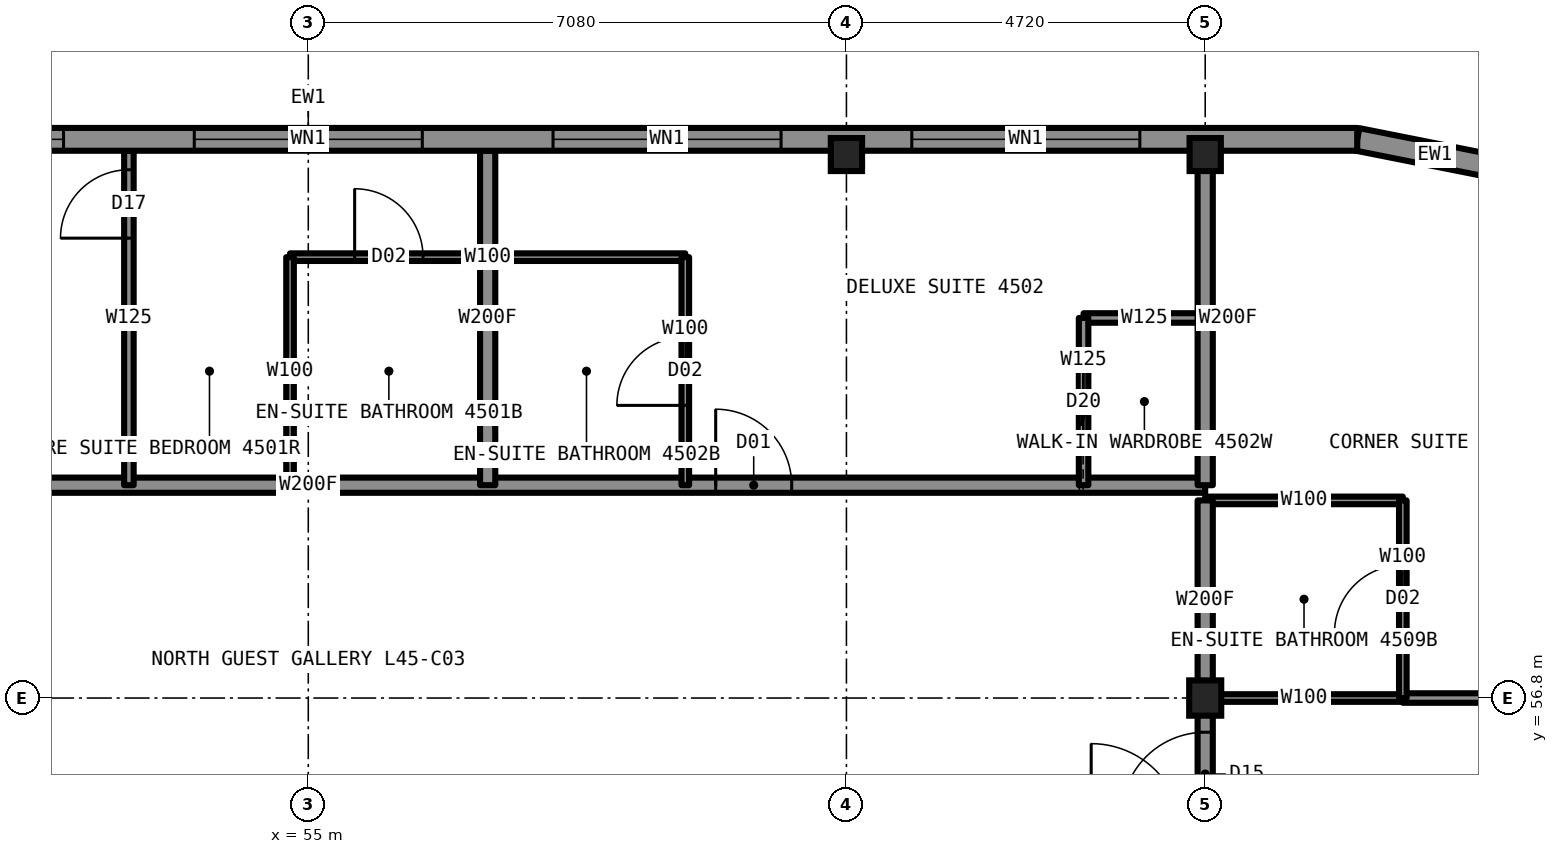
"""IFC4 building model, lengths in metres.
Left out: names, types, materials, properties, quantities, classifications, styles, units other than length and angle.
Written with IfcOpenShell. Run it as: python <this file> out.ifc"""

import sys

from ifc_helpers import new_model, si_unit, direction, frame, frame_2d, origin, origin_2d, place, context, subcontext, project, spatial, rectangle, i_section, extrude, element, fill, save


model = new_model("IFC4")
c1 = context("Model", 3, precision=1e-05, world=origin(), true_north=direction((0.0, 1.0)))
c2 = subcontext(c1, "Body", "Model", "MODEL_VIEW")
j1 = project(units=[si_unit("LENGTHUNIT", "METRE"), si_unit("PLANEANGLEUNIT", "RADIAN")], contexts=[c1])
p1 = place(None, origin())
s1 = spatial("IfcSite", under=j1, at=p1, CompositionType="ELEMENT")
p2 = place(p1, origin())
s2 = spatial("IfcBuilding", under=s1, at=p2, CompositionType="ELEMENT")
p3 = place(p2, frame((0.0, 0.0, 161.8)))
s3 = spatial("IfcBuildingStorey", under=s2, at=p3, CompositionType="ELEMENT", Elevation=161.8)
for number, where, z_axis, x_axis in (
    (1, (62.08, 63.95, 0.0), (0.0, 0.0, 1.0), (1.0, 0.0, 0.0)),
    (2, (66.8, 63.95, 0.0), (0.0, 0.0, 1.0), (1.0, 0.0, 0.0)),
):
    element("IfcColumn", number, at=place(p3, frame(where, z_axis=z_axis, x_axis=x_axis)), inside=s3, PredefinedType="COLUMN", context=c2, shape_type="SweptSolid", body=[
        extrude(i_section(OverallWidth=0.442, OverallDepth=0.531, WebThickness=0.066, FlangeThickness=0.106, at=origin_2d()), origin(), (0.0, 0.0, 1.0), 3.5),
    ])
p4 = place(p3, frame((66.8, 56.8, 0.0), z_axis=(0.0, 0.0, 1.0), x_axis=(1.0, 0.0, 0.0)))
e3 = element("IfcColumn", 3, at=p4, inside=s3, PredefinedType="COLUMN", context=c2, shape_type="SweptSolid", body=[
    extrude(i_section(OverallWidth=0.422, OverallDepth=0.465, WebThickness=0.045, FlangeThickness=0.073, at=origin_2d()), origin(), (0.0, 0.0, 1.0), 3.5),
])
p5 = place(p3, frame((66.8, 56.8, 0.0), z_axis=(0.0, 0.0, 1.0), x_axis=(1.0, 0.0, 0.0)))
e4 = element("IfcWall", 4, at=p5, inside=s3, PredefinedType="PARTITIONING", context=c2, shape_type="SweptSolid", body=[
    extrude(rectangle(XDim=2.6, YDim=0.1, at=frame_2d((1.3, 0.0))), origin(), (0.0, 0.0, 1.0), 2.573),
])
p6 = place(p3, frame((69.4, 56.8, 0.0), z_axis=(0.0, 0.0, 1.0), x_axis=(1.0, 0.0, 0.0)))
e5 = element("IfcWall", 5, at=p6, inside=s3, PredefinedType="PARTITIONING", context=c2, shape_type="SweptSolid", body=[
    extrude(rectangle(XDim=4.6, YDim=0.125, at=frame_2d((2.3, 0.0))), origin(), (0.0, 0.0, 1.0), 2.573),
])
p7 = place(p6, frame((1.15, 0.0, 0.0)))
e6 = element("IfcOpeningElement", 6, at=p7, cuts=e5, PredefinedType="OPENING", context=c2, shape_type="SweptSolid", body=[
    extrude(rectangle(XDim=0.9, YDim=2.2, at=frame_2d((0.45, 1.1))), frame((0.0, 0.073, 0.0), z_axis=(0.0, -1.0, 0.0), x_axis=(1.0, 0.0, 0.0)), (0.0, 0.0, 1.0), 0.145),
])
p8 = place(p3, frame((66.8, 59.4, 0.0), z_axis=(0.0, 0.0, 1.0), x_axis=(1.0, 0.0, 0.0)))
e7 = element("IfcWall", 7, at=p8, inside=s3, PredefinedType="PARTITIONING", context=c2, shape_type="SweptSolid", body=[
    extrude(rectangle(XDim=2.6, YDim=0.1, at=frame_2d((1.3, 0.0))), origin(), (0.0, 0.0, 1.0), 3.33),
])
p9 = place(p3, frame((43.2, 59.6, 0.0), z_axis=(0.0, 0.0, 1.0), x_axis=(1.0, 0.0, 0.0)))
e8 = element("IfcWall", 8, at=p9, inside=s3, PredefinedType="PARTITIONING", context=c2, shape_type="SweptSolid", body=[
    extrude(rectangle(XDim=23.6, YDim=0.2, at=frame_2d((11.8, 0.0))), origin(), (0.0, 0.0, 1.0), 3.33),
])
p10 = place(p9, frame((1.85, 0.0, 0.0)))
e9 = element("IfcOpeningElement", 9, at=p10, cuts=e8, PredefinedType="OPENING", context=c2, shape_type="SweptSolid", body=[
    extrude(rectangle(XDim=1.1, YDim=2.2, at=frame_2d((0.55, 1.1))), frame((0.0, 0.11, 0.0), z_axis=(0.0, -1.0, 0.0), x_axis=(1.0, 0.0, 0.0)), (0.0, 0.0, 1.0), 0.22),
])
p11 = place(p9, frame((17.16, 0.0, 0.0)))
e10 = element("IfcOpeningElement", 10, at=p11, cuts=e8, PredefinedType="OPENING", context=c2, shape_type="SweptSolid", body=[
    extrude(rectangle(XDim=1.0, YDim=2.2, at=frame_2d((0.5, 1.1))), frame((0.0, 0.11, 0.0), z_axis=(0.0, -1.0, 0.0), x_axis=(1.0, 0.0, 0.0)), (0.0, 0.0, 1.0), 0.22),
])
p12 = place(p3, frame((65.2, 61.8, 0.0), z_axis=(0.0, 0.0, 1.0), x_axis=(1.0, 0.0, 0.0)))
e11 = element("IfcWall", 11, at=p12, inside=s3, PredefinedType="PARTITIONING", context=c2, shape_type="SweptSolid", body=[
    extrude(rectangle(XDim=1.6, YDim=0.125, at=frame_2d((0.8, 0.0))), origin(), (0.0, 0.0, 1.0), 3.33),
])
p13 = place(p3, frame((54.76, 62.6, 0.0), z_axis=(0.0, 0.0, 1.0), x_axis=(1.0, 0.0, 0.0)))
e12 = element("IfcWall", 12, at=p13, inside=s3, PredefinedType="PARTITIONING", context=c2, shape_type="SweptSolid", body=[
    extrude(rectangle(XDim=5.2, YDim=0.1, at=frame_2d((2.6, 0.0))), origin(), (0.0, 0.0, 1.0), 3.33),
])
p14 = place(p13, frame((0.85, 0.0, 0.0)))
e13 = element("IfcOpeningElement", 13, at=p14, cuts=e12, PredefinedType="OPENING", context=c2, shape_type="SweptSolid", body=[
    extrude(rectangle(XDim=0.9, YDim=2.1, at=frame_2d((0.45, 1.05))), frame((0.0, 0.06, 0.0), z_axis=(0.0, -1.0, 0.0), x_axis=(1.0, 0.0, 0.0)), (0.0, 0.0, 1.0), 0.12),
])
p15 = place(p3, frame((54.76, 59.6, 0.0), z_axis=(0.0, 0.0, 1.0), x_axis=(0.0, 1.0, 0.0)))
e14 = element("IfcWall", 14, at=p15, inside=s3, PredefinedType="PARTITIONING", context=c2, shape_type="SweptSolid", body=[
    extrude(rectangle(XDim=3.0, YDim=0.1, at=frame_2d((1.5, 0.0))), origin(), (0.0, 0.0, 1.0), 3.33),
])
p16 = place(p3, frame((52.64, 59.6, 0.0), z_axis=(0.0, 0.0, 1.0), x_axis=(0.0, 1.0, 0.0)))
e15 = element("IfcWall", 15, at=p16, inside=s3, PredefinedType="PARTITIONING", context=c2, shape_type="SweptSolid", body=[
    extrude(rectangle(XDim=4.4, YDim=0.125, at=frame_2d((2.2, 0.0))), origin(), (0.0, 0.0, 1.0), 3.33),
])
p17 = place(p16, frame((3.25, 0.0, 0.0)))
e16 = element("IfcOpeningElement", 16, at=p17, cuts=e15, PredefinedType="OPENING", context=c2, shape_type="SweptSolid", body=[
    extrude(rectangle(XDim=0.9, YDim=2.2, at=frame_2d((0.45, 1.1))), frame((0.0, 0.073, 0.0), z_axis=(0.0, -1.0, 0.0), x_axis=(1.0, 0.0, 0.0)), (0.0, 0.0, 1.0), 0.145),
])
p18 = place(p3, frame((65.2, 59.6, 0.0), z_axis=(0.0, 0.0, 1.0), x_axis=(0.0, 1.0, 0.0)))
e17 = element("IfcWall", 17, at=p18, inside=s3, PredefinedType="PARTITIONING", context=c2, shape_type="SweptSolid", body=[
    extrude(rectangle(XDim=2.2, YDim=0.125, at=frame_2d((1.1, 0.0))), origin(), (0.0, 0.0, 1.0), 3.33),
])
p19 = place(p18, frame((0.7, 0.0, 0.0)))
e18 = element("IfcOpeningElement", 18, at=p19, cuts=e17, PredefinedType="OPENING", context=c2, shape_type="SweptSolid", body=[
    extrude(rectangle(XDim=0.8, YDim=2.1, at=frame_2d((0.4, 1.05))), frame((0.0, 0.073, 0.0), z_axis=(0.0, -1.0, 0.0), x_axis=(1.0, 0.0, 0.0)), (0.0, 0.0, 1.0), 0.145),
])
p20 = place(p3, frame((66.8, 33.22, 0.0), z_axis=(0.0, 0.0, 1.0), x_axis=(0.0, 1.0, 0.0)))
e19 = element("IfcWall", 19, at=p20, inside=s3, PredefinedType="PARTITIONING", context=c2, shape_type="SweptSolid", body=[
    extrude(rectangle(XDim=23.56, YDim=0.2, at=frame_2d((11.78, 0.0))), origin(), (0.0, 0.0, 1.0), 3.33),
])
p21 = place(p20, frame((5.1, 0.0, 0.0)))
e20 = element("IfcOpeningElement", 20, at=p21, cuts=e19, PredefinedType="OPENING", context=c2, shape_type="SweptSolid", body=[
    extrude(rectangle(XDim=1.0, YDim=2.2, at=frame_2d((0.5, 1.1))), frame((0.0, 0.11, 0.0), z_axis=(0.0, -1.0, 0.0), x_axis=(1.0, 0.0, 0.0)), (0.0, 0.0, 1.0), 0.22),
])
p22 = place(p20, frame((12.42, 0.0, 0.0)))
e21 = element("IfcOpeningElement", 21, at=p22, cuts=e19, PredefinedType="OPENING", context=c2, shape_type="SweptSolid", body=[
    extrude(rectangle(XDim=1.0, YDim=2.2, at=frame_2d((0.5, 1.1))), frame((0.0, 0.11, 0.0), z_axis=(0.0, -1.0, 0.0), x_axis=(1.0, 0.0, 0.0)), (0.0, 0.0, 1.0), 0.22),
])
p23 = place(p20, frame((22.03, 0.0, 0.0)))
e22 = element("IfcOpeningElement", 22, at=p23, cuts=e19, PredefinedType="OPENING", context=c2, shape_type="SweptSolid", body=[
    extrude(rectangle(XDim=1.1, YDim=2.2, at=frame_2d((0.55, 1.1))), frame((0.0, 0.11, 0.0), z_axis=(0.0, -1.0, 0.0), x_axis=(1.0, 0.0, 0.0)), (0.0, 0.0, 1.0), 0.22),
])
p24 = place(p20, frame((0.63, 0.0, 0.0)))
e23 = element("IfcOpeningElement", 23, at=p24, cuts=e19, PredefinedType="OPENING", context=c2, shape_type="SweptSolid", body=[
    extrude(rectangle(XDim=1.1, YDim=2.2, at=frame_2d((0.55, 1.1))), frame((0.0, 0.11, 0.0), z_axis=(0.0, -1.0, 0.0), x_axis=(1.0, 0.0, 0.0)), (0.0, 0.0, 1.0), 0.22),
])
p25 = place(p3, frame((66.8, 59.6, 0.0), z_axis=(0.0, 0.0, 1.0), x_axis=(0.0, 1.0, 0.0)))
e24 = element("IfcWall", 24, at=p25, inside=s3, PredefinedType="PARTITIONING", context=c2, shape_type="SweptSolid", body=[
    extrude(rectangle(XDim=4.4, YDim=0.2, at=frame_2d((2.2, 0.0))), origin(), (0.0, 0.0, 1.0), 2.573),
])
p26 = place(p3, frame((69.4, 56.8, 0.0), z_axis=(0.0, 0.0, 1.0), x_axis=(0.0, 1.0, 0.0)))
e25 = element("IfcWall", 25, at=p26, inside=s3, PredefinedType="PARTITIONING", context=c2, shape_type="SweptSolid", body=[
    extrude(rectangle(XDim=2.6, YDim=0.1, at=frame_2d((1.3, 0.0))), origin(), (0.0, 0.0, 1.0), 3.33),
])
p27 = place(p26, frame((0.85, 0.0, 0.0)))
e26 = element("IfcOpeningElement", 26, at=p27, cuts=e25, PredefinedType="OPENING", context=c2, shape_type="SweptSolid", body=[
    extrude(rectangle(XDim=0.9, YDim=2.1, at=frame_2d((0.45, 1.05))), frame((0.0, 0.06, 0.0), z_axis=(0.0, -1.0, 0.0), x_axis=(1.0, 0.0, 0.0)), (0.0, 0.0, 1.0), 0.12),
])
p28 = place(p3, frame((57.36, 59.6, 0.0), z_axis=(0.0, 0.0, 1.0), x_axis=(0.0, 1.0, 0.0)))
e27 = element("IfcWall", 27, at=p28, inside=s3, PredefinedType="PARTITIONING", context=c2, shape_type="SweptSolid", body=[
    extrude(rectangle(XDim=4.4, YDim=0.2, at=frame_2d((2.2, 0.0))), origin(), (0.0, 0.0, 1.0), 3.33),
])
p29 = place(p3, frame((59.96, 59.6, 0.0), z_axis=(0.0, 0.0, 1.0), x_axis=(0.0, 1.0, 0.0)))
e28 = element("IfcWall", 28, at=p29, inside=s3, PredefinedType="PARTITIONING", context=c2, shape_type="SweptSolid", body=[
    extrude(rectangle(XDim=3.0, YDim=0.1, at=frame_2d((1.5, 0.0))), origin(), (0.0, 0.0, 1.0), 3.33),
])
p30 = place(p29, frame((1.05, 0.0, 0.0)))
e29 = element("IfcOpeningElement", 29, at=p30, cuts=e28, PredefinedType="OPENING", context=c2, shape_type="SweptSolid", body=[
    extrude(rectangle(XDim=0.9, YDim=2.1, at=frame_2d((0.45, 1.05))), frame((0.0, 0.06, 0.0), z_axis=(0.0, -1.0, 0.0), x_axis=(1.0, 0.0, 0.0)), (0.0, 0.0, 1.0), 0.12),
])
p31 = place(p3, frame((70.847, 63.743, 0.0), z_axis=(0.0, 0.0, 1.0), x_axis=(-0.980787050784, 0.195081421501, 0.0)))
e30 = element("IfcWall", 30, at=p31, inside=s3, PredefinedType="SOLIDWALL", context=c2, shape_type="SweptSolid", body=[
    extrude(rectangle(XDim=2.087, YDim=0.3, at=frame_2d((1.044, 0.0))), origin(), (0.0, 0.0, 1.0), 3.33),
])
p32 = place(p31, frame((0.444, 0.0, 0.3)))
e31 = element("IfcOpeningElement", 31, at=p32, cuts=e30, PredefinedType="OPENING", context=c2, shape_type="SweptSolid", body=[
    extrude(rectangle(XDim=1.2, YDim=2.0, at=frame_2d((0.6, 1.0))), frame((0.0, 0.16, 0.0), z_axis=(0.0, -1.0, 0.0), x_axis=(1.0, 0.0, 0.0)), (0.0, 0.0, 1.0), 0.32),
])
p33 = place(p3, frame((68.8, 64.15, 0.0), z_axis=(0.0, 0.0, 1.0), x_axis=(-1.0, 0.0, 0.0)))
e32 = element("IfcWall", 32, at=p33, inside=s3, PredefinedType="SOLIDWALL", context=c2, shape_type="SweptSolid", body=[
    extrude(rectangle(XDim=27.6, YDim=0.3, at=frame_2d((13.8, 0.0))), origin(), (0.0, 0.0, 1.0), 2.83),
])
p34 = place(p33, frame((2.86, 0.0, 0.3)))
e33 = element("IfcOpeningElement", 33, at=p34, cuts=e32, PredefinedType="OPENING", context=c2, shape_type="SweptSolid", body=[
    extrude(rectangle(XDim=3.0, YDim=2.0, at=frame_2d((1.5, 1.0))), frame((0.0, 0.16, 0.0), z_axis=(0.0, -1.0, 0.0), x_axis=(1.0, 0.0, 0.0)), (0.0, 0.0, 1.0), 0.32),
])
p35 = place(p33, frame((7.58, 0.0, 0.3)))
e34 = element("IfcOpeningElement", 34, at=p35, cuts=e32, PredefinedType="OPENING", context=c2, shape_type="SweptSolid", body=[
    extrude(rectangle(XDim=3.0, YDim=2.0, at=frame_2d((1.5, 1.0))), frame((0.0, 0.16, 0.0), z_axis=(0.0, -1.0, 0.0), x_axis=(1.0, 0.0, 0.0)), (0.0, 0.0, 1.0), 0.32),
])
p36 = place(p33, frame((12.3, 0.0, 0.3)))
e35 = element("IfcOpeningElement", 35, at=p36, cuts=e32, PredefinedType="OPENING", context=c2, shape_type="SweptSolid", body=[
    extrude(rectangle(XDim=3.0, YDim=2.0, at=frame_2d((1.5, 1.0))), frame((0.0, 0.16, 0.0), z_axis=(0.0, -1.0, 0.0), x_axis=(1.0, 0.0, 0.0)), (0.0, 0.0, 1.0), 0.32),
])
p37 = place(p33, frame((17.02, 0.0, 0.3)))
e36 = element("IfcOpeningElement", 36, at=p37, cuts=e32, PredefinedType="OPENING", context=c2, shape_type="SweptSolid", body=[
    extrude(rectangle(XDim=3.0, YDim=2.0, at=frame_2d((1.5, 1.0))), frame((0.0, 0.16, 0.0), z_axis=(0.0, -1.0, 0.0), x_axis=(1.0, 0.0, 0.0)), (0.0, 0.0, 1.0), 0.32),
])
p38 = place(p33, frame((21.74, 0.0, 0.3)))
e37 = element("IfcOpeningElement", 37, at=p38, cuts=e32, PredefinedType="OPENING", context=c2, shape_type="SweptSolid", body=[
    extrude(rectangle(XDim=3.0, YDim=2.0, at=frame_2d((1.5, 1.0))), frame((0.0, 0.16, 0.0), z_axis=(0.0, -1.0, 0.0), x_axis=(1.0, 0.0, 0.0)), (0.0, 0.0, 1.0), 0.32),
])
p39 = place(p3, frame((66.8, 56.78, 0.0), z_axis=(0.0, 0.0, 1.0), x_axis=(0.0, 1.0, 0.0)))
e38 = element("IfcWall", 38, at=p39, inside=s3, PredefinedType="PARTITIONING", context=c2, shape_type="SweptSolid", body=[
    extrude(rectangle(XDim=2.62, YDim=0.2, at=frame_2d((1.31, 0.0))), origin(), (0.0, 0.0, 1.0), 2.573),
])
p40 = place(p14, origin())
e39 = element("IfcDoor", 39, at=p40, inside=s3, OperationType="SINGLE_SWING_RIGHT", PredefinedType="DOOR", context=c2, shape_type="SweptSolid", body=[
    extrude(rectangle(XDim=0.9, YDim=2.1, at=frame_2d((0.45, 1.05))), frame((0.0, 0.025, 0.0), z_axis=(0.0, -1.0, 0.0), x_axis=(1.0, 0.0, 0.0)), (0.0, 0.0, 1.0), 0.05),
])
fill(e13, e39)
p41 = place(p17, origin())
e40 = element("IfcDoor", 40, at=p41, inside=s3, OperationType="SINGLE_SWING_LEFT", PredefinedType="DOOR", context=c2, shape_type="SweptSolid", body=[
    extrude(rectangle(XDim=0.9, YDim=2.2, at=frame_2d((0.45, 1.1))), frame((0.0, 0.025, 0.0), z_axis=(0.0, -1.0, 0.0), x_axis=(1.0, 0.0, 0.0)), (0.0, 0.0, 1.0), 0.05),
])
fill(e16, e40)
p42 = place(p11, origin())
e41 = element("IfcDoor", 41, at=p42, inside=s3, OperationType="SINGLE_SWING_LEFT", PredefinedType="DOOR", context=c2, shape_type="SweptSolid", body=[
    extrude(rectangle(XDim=1.0, YDim=2.2, at=frame_2d((0.5, 1.1))), frame((0.0, 0.025, 0.0), z_axis=(0.0, -1.0, 0.0), x_axis=(1.0, 0.0, 0.0)), (0.0, 0.0, 1.0), 0.05),
])
fill(e10, e41)
p43 = place(p30, origin())
e42 = element("IfcDoor", 42, at=p43, inside=s3, OperationType="SINGLE_SWING_RIGHT", PredefinedType="DOOR", context=c2, shape_type="SweptSolid", body=[
    extrude(rectangle(XDim=0.9, YDim=2.1, at=frame_2d((0.45, 1.05))), frame((0.0, 0.025, 0.0), z_axis=(0.0, -1.0, 0.0), x_axis=(1.0, 0.0, 0.0)), (0.0, 0.0, 1.0), 0.05),
])
fill(e29, e42)
p44 = place(p19, origin())
e43 = element("IfcDoor", 43, at=p44, inside=s3, OperationType="SLIDING_TO_LEFT", PredefinedType="DOOR", context=c2, shape_type="SweptSolid", body=[
    extrude(rectangle(XDim=0.8, YDim=2.1, at=frame_2d((0.4, 1.05))), frame((0.0, 0.025, 0.0), z_axis=(0.0, -1.0, 0.0), x_axis=(1.0, 0.0, 0.0)), (0.0, 0.0, 1.0), 0.05),
])
fill(e18, e43)
p45 = place(p23, origin())
e44 = element("IfcDoor", 44, at=p45, inside=s3, OperationType="SINGLE_SWING_LEFT", PredefinedType="DOOR", context=c2, shape_type="SweptSolid", body=[
    extrude(rectangle(XDim=1.1, YDim=2.2, at=frame_2d((0.55, 1.1))), frame((0.0, 0.025, 0.0), z_axis=(0.0, -1.0, 0.0), x_axis=(1.0, 0.0, 0.0)), (0.0, 0.0, 1.0), 0.05),
])
fill(e22, e44)
p46 = place(p27, origin())
e45 = element("IfcDoor", 45, at=p46, inside=s3, OperationType="SINGLE_SWING_RIGHT", PredefinedType="DOOR", context=c2, shape_type="SweptSolid", body=[
    extrude(rectangle(XDim=0.9, YDim=2.1, at=frame_2d((0.45, 1.05))), frame((0.0, 0.025, 0.0), z_axis=(0.0, -1.0, 0.0), x_axis=(1.0, 0.0, 0.0)), (0.0, 0.0, 1.0), 0.05),
])
fill(e26, e45)
p47 = place(p32, origin())
e46 = element("IfcWindow", 46, at=p47, inside=s3, PartitioningType="SINGLE_PANEL", PredefinedType="WINDOW", context=c2, shape_type="SweptSolid", body=[
    extrude(rectangle(XDim=1.2, YDim=2.0, at=frame_2d((0.6, 1.0))), frame((0.0, 0.13, 0.0), z_axis=(0.0, -1.0, 0.0), x_axis=(1.0, 0.0, 0.0)), (0.0, 0.0, 1.0), 0.06),
])
fill(e31, e46)
p48 = place(p34, origin())
e47 = element("IfcWindow", 47, at=p48, inside=s3, PartitioningType="SINGLE_PANEL", PredefinedType="WINDOW", context=c2, shape_type="SweptSolid", body=[
    extrude(rectangle(XDim=3.0, YDim=2.0, at=frame_2d((1.5, 1.0))), frame((0.0, 0.13, 0.0), z_axis=(0.0, -1.0, 0.0), x_axis=(1.0, 0.0, 0.0)), (0.0, 0.0, 1.0), 0.06),
])
fill(e33, e47)
p49 = place(p35, origin())
e48 = element("IfcWindow", 48, at=p49, inside=s3, PartitioningType="SINGLE_PANEL", PredefinedType="WINDOW", context=c2, shape_type="SweptSolid", body=[
    extrude(rectangle(XDim=3.0, YDim=2.0, at=frame_2d((1.5, 1.0))), frame((0.0, 0.13, 0.0), z_axis=(0.0, -1.0, 0.0), x_axis=(1.0, 0.0, 0.0)), (0.0, 0.0, 1.0), 0.06),
])
fill(e34, e48)
p50 = place(p36, origin())
e49 = element("IfcWindow", 49, at=p50, inside=s3, PartitioningType="SINGLE_PANEL", PredefinedType="WINDOW", context=c2, shape_type="SweptSolid", body=[
    extrude(rectangle(XDim=3.0, YDim=2.0, at=frame_2d((1.5, 1.0))), frame((0.0, 0.13, 0.0), z_axis=(0.0, -1.0, 0.0), x_axis=(1.0, 0.0, 0.0)), (0.0, 0.0, 1.0), 0.06),
])
fill(e35, e49)
p51 = place(p37, origin())
e50 = element("IfcWindow", 50, at=p51, inside=s3, PartitioningType="SINGLE_PANEL", PredefinedType="WINDOW", context=c2, shape_type="SweptSolid", body=[
    extrude(rectangle(XDim=3.0, YDim=2.0, at=frame_2d((1.5, 1.0))), frame((0.0, 0.13, 0.0), z_axis=(0.0, -1.0, 0.0), x_axis=(1.0, 0.0, 0.0)), (0.0, 0.0, 1.0), 0.06),
])
fill(e36, e50)
save(model, sys.argv[1])
